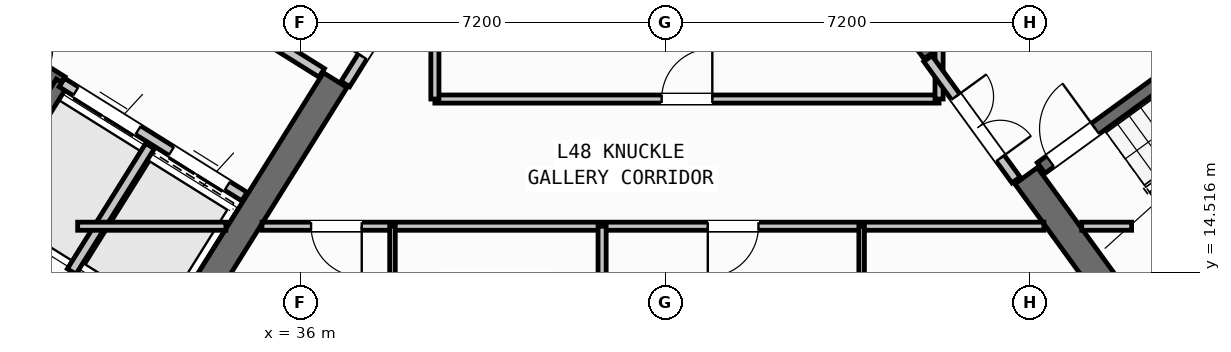
"""IFC4 building model, lengths in metres.
Left out: names, types, materials, properties, quantities, classifications, styles, units other than length and angle.
Written with IfcOpenShell. Run it as: python <this file> out.ifc"""

import sys

from ifc_helpers import new_model, si_unit, direction, frame, frame_2d, origin, place, context, subcontext, project, spatial, rectangle, extrude, source, transform, mapped, element, fill, save


model = new_model("IFC4")
c1 = context("Model", 3, precision=1e-05, world=origin(), true_north=direction((0.0, 1.0)))
c2 = subcontext(c1, "Body", "Model", "MODEL_VIEW")
j1 = project(units=[si_unit("LENGTHUNIT", "METRE"), si_unit("PLANEANGLEUNIT", "RADIAN")], contexts=[c1])
p1 = place(None, origin())
s1 = spatial("IfcSite", under=j1, at=p1, CompositionType="ELEMENT")
p2 = place(p1, origin())
s2 = spatial("IfcBuilding", under=s1, at=p2, CompositionType="ELEMENT")
p3 = place(p2, frame((0.0, 0.0, 191.4)))
s3 = spatial("IfcBuildingStorey", under=s2, at=p3, CompositionType="ELEMENT", Elevation=191.4)
p4 = place(p3, frame((33.366, 12.477, 0.0), z_axis=(0.0, 0.0, 1.0), x_axis=(-0.848047359947, 0.529920442413, 0.0)))
e1 = element("IfcWall", 1, at=p4, inside=s3, PredefinedType="SHEAR", context=c2, shape_type="SweptSolid", body=[
    extrude(rectangle(XDim=13.14, YDim=0.55, at=frame_2d((6.57, 0.0))), origin(), (0.0, 0.0, 1.0), 3.32),
])
p5 = place(p3, frame((36.683, 18.304, 0.0), z_axis=(0.0, 0.0, 1.0), x_axis=(-0.529896466841, -0.848062341122, 0.0)))
e2 = element("IfcWall", 2, at=p5, inside=s3, PredefinedType="SHEAR", context=c2, shape_type="SweptSolid", body=[
    extrude(rectangle(XDim=6.425, YDim=0.55, at=frame_2d((3.212, 0.0))), origin(), (0.0, 0.0, 1.0), 3.32),
])
p6 = place(p3, frame((52.359, 13.14, 0.0), z_axis=(0.0, 0.0, 1.0), x_axis=(0.809014896919, 0.587788139183, 0.0)))
e3 = element("IfcWall", 3, at=p6, inside=s3, PredefinedType="SHEAR", context=c2, shape_type="SweptSolid", body=[
    extrude(rectangle(XDim=12.34, YDim=0.55, at=frame_2d((6.17, 0.0))), origin(), (0.0, 0.0, 1.0), 3.32),
])
p7 = place(p3, frame((52.42, 13.524, 0.0), z_axis=(0.0, 0.0, 1.0), x_axis=(-0.587802113096, 0.809004744015, 0.0)))
e4 = element("IfcWall", 4, at=p7, inside=s3, PredefinedType="SHEAR", context=c2, shape_type="SweptSolid", body=[
    extrude(rectangle(XDim=3.575, YDim=0.55, at=frame_2d((1.788, 0.0))), origin(), (0.0, 0.0, 1.0), 3.32),
])
p8 = place(p3, frame((48.526, 18.884, 0.0), z_axis=(0.0, 0.0, 1.0), x_axis=(-0.587764933797, 0.809031756236, 0.0)))
e5 = element("IfcWall", 5, at=p8, inside=s3, PredefinedType="SHEAR", context=c2, shape_type="SweptSolid", body=[
    extrude(rectangle(XDim=6.425, YDim=0.55, at=frame_2d((3.212, 0.0))), origin(), (0.0, 0.0, 1.0), 3.32),
])
p9 = place(p3, frame((31.76, 12.183, 0.0), z_axis=(0.0, 0.0, 1.0), x_axis=(-0.848047074256, 0.529920899612, 0.0)))
e6 = element("IfcWall", 6, at=p9, inside=s3, PredefinedType="STANDARD", context=c2, shape_type="SweptSolid", body=[
    extrude(rectangle(XDim=30.652, YDim=0.32, at=frame_2d((15.326, 0.0))), origin(), (0.0, 0.0, 1.0), 3.32),
])
p10 = place(p9, frame((15.166, 0.0, 0.0)))
e7 = element("IfcOpeningElement", 7, at=p10, cuts=e6, PredefinedType="OPENING", context=c2, shape_type="SweptSolid", body=[
    extrude(rectangle(XDim=1.2, YDim=2.15, at=frame_2d((0.6, 1.075))), frame((0.0, 0.17, 0.0), z_axis=(0.0, -1.0, 0.0), x_axis=(1.0, 0.0, 0.0)), (0.0, 0.0, 1.0), 0.34),
])
p11 = place(p9, frame((2.015, 0.0, 0.8)))
e8 = element("IfcOpeningElement", 8, at=p11, cuts=e6, PredefinedType="OPENING", context=c2, shape_type="SweptSolid", body=[
    extrude(rectangle(XDim=2.1, YDim=1.55, at=frame_2d((1.05, 0.775))), frame((0.0, 0.17, 0.0), z_axis=(0.0, -1.0, 0.0), x_axis=(1.0, 0.0, 0.0)), (0.0, 0.0, 1.0), 0.34),
])
p12 = place(p9, frame((7.244, 0.0, 0.8)))
e9 = element("IfcOpeningElement", 9, at=p12, cuts=e6, PredefinedType="OPENING", context=c2, shape_type="SweptSolid", body=[
    extrude(rectangle(XDim=2.1, YDim=1.55, at=frame_2d((1.05, 0.775))), frame((0.0, 0.17, 0.0), z_axis=(0.0, -1.0, 0.0), x_axis=(1.0, 0.0, 0.0)), (0.0, 0.0, 1.0), 0.34),
])
p13 = place(p9, frame((12.623, 0.0, 1.0)))
e10 = element("IfcOpeningElement", 10, at=p13, cuts=e6, PredefinedType="OPENING", context=c2, shape_type="SweptSolid", body=[
    extrude(rectangle(XDim=0.9, YDim=1.25, at=frame_2d((0.45, 0.625))), frame((0.0, 0.17, 0.0), z_axis=(0.0, -1.0, 0.0), x_axis=(1.0, 0.0, 0.0)), (0.0, 0.0, 1.0), 0.34),
])
p14 = place(p9, frame((19.565, 0.0, 0.95)))
e11 = element("IfcOpeningElement", 11, at=p14, cuts=e6, PredefinedType="OPENING", context=c2, shape_type="SweptSolid", body=[
    extrude(rectangle(XDim=1.2, YDim=1.4, at=frame_2d((0.6, 0.7))), frame((0.0, 0.17, 0.0), z_axis=(0.0, -1.0, 0.0), x_axis=(1.0, 0.0, 0.0)), (0.0, 0.0, 1.0), 0.34),
])
p15 = place(p9, frame((25.983, 0.0, 1.0)))
e12 = element("IfcOpeningElement", 12, at=p15, cuts=e6, PredefinedType="OPENING", context=c2, shape_type="SweptSolid", body=[
    extrude(rectangle(XDim=0.9, YDim=1.25, at=frame_2d((0.45, 0.625))), frame((0.0, 0.17, 0.0), z_axis=(0.0, -1.0, 0.0), x_axis=(1.0, 0.0, 0.0)), (0.0, 0.0, 1.0), 0.34),
])
p16 = place(p9, frame((28.433, 0.0, 1.0)))
e13 = element("IfcOpeningElement", 13, at=p16, cuts=e6, PredefinedType="OPENING", context=c2, shape_type="SweptSolid", body=[
    extrude(rectangle(XDim=0.9, YDim=1.25, at=frame_2d((0.45, 0.625))), frame((0.0, 0.17, 0.0), z_axis=(0.0, -1.0, 0.0), x_axis=(1.0, 0.0, 0.0)), (0.0, 0.0, 1.0), 0.34),
])
p17 = place(p3, frame((31.28, 18.261, 0.0), z_axis=(0.0, 0.0, 1.0), x_axis=(-0.848051618787, 0.529913626805, 0.0)))
e14 = element("IfcWall", 14, at=p17, inside=s3, PredefinedType="SHEAR", context=c2, shape_type="SweptSolid", body=[
    extrude(rectangle(XDim=7.46, YDim=0.26, at=frame_2d((3.73, 0.0))), origin(), (0.0, 0.0, 1.0), 3.32),
])
p18 = place(p17, frame((0.36, 0.0, 0.0)))
e15 = element("IfcOpeningElement", 15, at=p18, cuts=e14, PredefinedType="OPENING", context=c2, shape_type="SweptSolid", body=[
    extrude(rectangle(XDim=0.86, YDim=2.05, at=frame_2d((0.43, 1.025))), frame((0.0, 0.14, 0.0), z_axis=(0.0, -1.0, 0.0), x_axis=(1.0, 0.0, 0.0)), (0.0, 0.0, 1.0), 0.28),
])
p19 = place(p3, frame((31.288, 18.256, 0.0), z_axis=(0.0, 0.0, 1.0), x_axis=(-0.529943379326, -0.848033026897, 0.0)))
e16 = element("IfcWall", 16, at=p19, inside=s3, PredefinedType="SHEAR", context=c2, shape_type="SweptSolid", body=[
    extrude(rectangle(XDim=3.16, YDim=0.26, at=frame_2d((1.58, 0.0))), origin(), (0.0, 0.0, 1.0), 3.32),
])
p20 = place(p3, frame((34.891, 16.005, 0.0), z_axis=(0.0, 0.0, 1.0), x_axis=(-0.848062873452, 0.529895614884, 0.0)))
e17 = element("IfcWall", 17, at=p20, inside=s3, PredefinedType="STANDARD", context=c2, shape_type="SweptSolid", body=[
    extrude(rectangle(XDim=4.248, YDim=0.2, at=frame_2d((2.124, 0.0))), origin(), (0.0, 0.0, 1.0), 3.31),
])
p21 = place(p20, frame((0.398, 0.0, 0.0)))
e18 = element("IfcOpeningElement", 18, at=p21, cuts=e17, PredefinedType="OPENING", context=c2, shape_type="SweptSolid", body=[
    extrude(rectangle(XDim=1.3, YDim=2.2, at=frame_2d((0.65, 1.1))), frame((0.0, 0.11, 0.0), z_axis=(0.0, -1.0, 0.0), x_axis=(1.0, 0.0, 0.0)), (0.0, 0.0, 1.0), 0.22),
])
p22 = place(p20, frame((2.473, 0.0, 0.0)))
e19 = element("IfcOpeningElement", 19, at=p22, cuts=e17, PredefinedType="OPENING", context=c2, shape_type="SweptSolid", body=[
    extrude(rectangle(XDim=1.45, YDim=2.25, at=frame_2d((0.725, 1.125))), frame((0.0, 0.11, 0.0), z_axis=(0.0, -1.0, 0.0), x_axis=(1.0, 0.0, 0.0)), (0.0, 0.0, 1.0), 0.22),
])
p23 = place(p3, frame((36.417, 18.447, 0.0), z_axis=(0.0, 0.0, 1.0), x_axis=(-0.848064879198, 0.529892404805, 0.0)))
e20 = element("IfcWall", 20, at=p23, inside=s3, PredefinedType="STANDARD", context=c2, shape_type="SweptSolid", body=[
    extrude(rectangle(XDim=5.768, YDim=0.2, at=frame_2d((2.884, 0.0))), origin(), (0.0, 0.0, 1.0), 3.31),
])
p24 = place(p23, frame((2.548, 0.0, 0.0)))
e21 = element("IfcOpeningElement", 21, at=p24, cuts=e20, PredefinedType="OPENING", context=c2, shape_type="SweptSolid", body=[
    extrude(rectangle(XDim=1.15, YDim=2.1, at=frame_2d((0.575, 1.05))), frame((0.0, 0.11, 0.0), z_axis=(0.0, -1.0, 0.0), x_axis=(1.0, 0.0, 0.0)), (0.0, 0.0, 1.0), 0.22),
])
p25 = place(p3, frame((33.029, 17.003, 0.0), z_axis=(0.0, 0.0, 1.0), x_axis=(-0.529916267533, -0.848049968695, 0.0)))
e22 = element("IfcWall", 22, at=p25, inside=s3, PredefinedType="STANDARD", context=c2, shape_type="SweptSolid", body=[
    extrude(rectangle(XDim=2.92, YDim=0.2, at=frame_2d((1.46, 0.0))), origin(), (0.0, 0.0, 1.0), 3.31),
])
p26 = place(p3, frame((52.472, 14.013, 0.0), z_axis=(0.0, 0.0, 1.0), x_axis=(0.809028366311, 0.587769599847, 0.0)))
e23 = element("IfcWall", 23, at=p26, inside=s3, PredefinedType="SHEAR", context=c2, shape_type="SweptSolid", body=[
    extrude(rectangle(XDim=7.33, YDim=0.26, at=frame_2d((3.665, 0.0))), origin(), (0.0, 0.0, 1.0), 3.32),
])
p27 = place(p3, frame((50.615, 16.57, 0.0), z_axis=(0.0, 0.0, 1.0), x_axis=(0.809028366311, 0.587769599847, 0.0)))
e24 = element("IfcWall", 24, at=p27, inside=s3, PredefinedType="SHEAR", context=c2, shape_type="SweptSolid", body=[
    extrude(rectangle(XDim=7.33, YDim=0.26, at=frame_2d((3.665, 0.0))), origin(), (0.0, 0.0, 1.0), 3.32),
])
p28 = place(p27, frame((0.22, 0.0, 0.0)))
e25 = element("IfcOpeningElement", 25, at=p28, cuts=e24, PredefinedType="OPENING", context=c2, shape_type="SweptSolid", body=[
    extrude(rectangle(XDim=1.1, YDim=2.1, at=frame_2d((0.55, 1.05))), frame((0.0, 0.14, 0.0), z_axis=(0.0, -1.0, 0.0), x_axis=(1.0, 0.0, 0.0)), (0.0, 0.0, 1.0), 0.28),
])
p29 = place(p3, frame((38.451, 20.737, 0.0), z_axis=(0.0, 0.0, 1.0), x_axis=(-0.529924799939, -0.848044637038, 0.0)))
e26 = element("IfcWall", 26, at=p29, inside=s3, PredefinedType="STANDARD", context=c2, shape_type="SweptSolid", body=[
    extrude(rectangle(XDim=2.96, YDim=0.2, at=frame_2d((1.48, 0.0))), origin(), (0.0, 0.0, 1.0), 3.31),
])
p30 = place(p29, frame((1.46, 0.0, 0.0)))
e27 = element("IfcOpeningElement", 27, at=p30, cuts=e26, PredefinedType="OPENING", context=c2, shape_type="SweptSolid", body=[
    extrude(rectangle(XDim=0.86, YDim=2.05, at=frame_2d((0.43, 1.025))), frame((0.0, 0.11, 0.0), z_axis=(0.0, -1.0, 0.0), x_axis=(1.0, 0.0, 0.0)), (0.0, 0.0, 1.0), 0.22),
])
p31 = place(p3, frame((31.6, 15.42, 0.0), z_axis=(0.0, 0.0, 1.0), x_axis=(1.0, 0.0, 0.0)))
e28 = element("IfcWall", 28, at=p31, inside=s3, PredefinedType="PARTITIONING", context=c2, shape_type="SweptSolid", body=[
    extrude(rectangle(XDim=2.925, YDim=0.16, at=frame_2d((1.462, 0.0))), origin(), (0.0, 0.0, 1.0), 3.31),
])
p32 = place(p3, frame((35.237, 15.42, 0.0), z_axis=(0.0, 0.0, 1.0), x_axis=(1.0, 0.0, 0.0)))
e29 = element("IfcWall", 29, at=p32, inside=s3, PredefinedType="PARTITIONING", context=c2, shape_type="SweptSolid", body=[
    extrude(rectangle(XDim=15.432, YDim=0.16, at=frame_2d((7.716, 0.0))), origin(), (0.0, 0.0, 1.0), 3.31),
])
p33 = place(p32, frame((0.969, 0.0, 0.0)))
e30 = element("IfcOpeningElement", 30, at=p33, cuts=e29, PredefinedType="OPENING", context=c2, shape_type="SweptSolid", body=[
    extrude(rectangle(XDim=1.0, YDim=2.1, at=frame_2d((0.5, 1.05))), frame((0.0, 0.09, 0.0), z_axis=(0.0, -1.0, 0.0), x_axis=(1.0, 0.0, 0.0)), (0.0, 0.0, 1.0), 0.18),
])
p34 = place(p32, frame((8.799, 0.0, 0.0)))
e31 = element("IfcOpeningElement", 31, at=p34, cuts=e29, PredefinedType="OPENING", context=c2, shape_type="SweptSolid", body=[
    extrude(rectangle(XDim=1.0, YDim=2.1, at=frame_2d((0.5, 1.05))), frame((0.0, 0.09, 0.0), z_axis=(0.0, -1.0, 0.0), x_axis=(1.0, 0.0, 0.0)), (0.0, 0.0, 1.0), 0.18),
])
p35 = place(p3, frame((51.416, 15.42, 0.0), z_axis=(0.0, 0.0, 1.0), x_axis=(1.0, 0.0, 0.0)))
e32 = element("IfcWall", 32, at=p35, inside=s3, PredefinedType="PARTITIONING", context=c2, shape_type="SweptSolid", body=[
    extrude(rectangle(XDim=0.984, YDim=0.16, at=frame_2d((0.492, 0.0))), origin(), (0.0, 0.0, 1.0), 3.31),
])
p36 = place(p3, frame((38.65, 17.93, 0.0), z_axis=(0.0, 0.0, 1.0), x_axis=(1.0, 0.0, 0.0)))
e33 = element("IfcWall", 33, at=p36, inside=s3, PredefinedType="PARTITIONING", context=c2, shape_type="SweptSolid", body=[
    extrude(rectangle(XDim=9.95, YDim=0.16, at=frame_2d((4.975, 0.0))), origin(), (0.0, 0.0, 1.0), 3.31),
])
p37 = place(p36, frame((4.475, 0.0, 0.0)))
e34 = element("IfcOpeningElement", 34, at=p37, cuts=e33, PredefinedType="OPENING", context=c2, shape_type="SweptSolid", body=[
    extrude(rectangle(XDim=1.0, YDim=2.1, at=frame_2d((0.5, 1.05))), frame((0.0, 0.09, 0.0), z_axis=(0.0, -1.0, 0.0), x_axis=(1.0, 0.0, 0.0)), (0.0, 0.0, 1.0), 0.18),
])
p38 = place(p3, frame((38.65, 17.93, 0.0), z_axis=(0.0, 0.0, 1.0), x_axis=(0.0, 1.0, 0.0)))
e35 = element("IfcWall", 35, at=p38, inside=s3, PredefinedType="PARTITIONING", context=c2, shape_type="SweptSolid", body=[
    extrude(rectangle(XDim=2.951, YDim=0.16, at=frame_2d((1.476, 0.0))), origin(), (0.0, 0.0, 1.0), 3.31),
])
p39 = place(p3, frame((48.6, 17.93, 0.0), z_axis=(0.0, 0.0, 1.0), x_axis=(0.0, 1.0, 0.0)))
e36 = element("IfcWall", 36, at=p39, inside=s3, PredefinedType="PARTITIONING", context=c2, shape_type="SweptSolid", body=[
    extrude(rectangle(XDim=0.993, YDim=0.16, at=frame_2d((0.496, 0.0))), origin(), (0.0, 0.0, 1.0), 3.31),
])
p40 = place(p3, frame((50.119, 16.333, 0.0), z_axis=(0.0, 0.0, 1.0), x_axis=(-0.587749856981, 0.809042709391, 0.0)))
e37 = element("IfcWall", 37, at=p40, inside=s3, PredefinedType="STANDARD", context=c2, shape_type="SweptSolid", body=[
    extrude(rectangle(XDim=2.96, YDim=0.2, at=frame_2d((1.48, 0.0))), origin(), (0.0, 0.0, 1.0), 3.31),
])
p41 = place(p40, frame((0.53, 0.0, 0.0)))
e38 = element("IfcOpeningElement", 38, at=p41, cuts=e37, PredefinedType="OPENING", context=c2, shape_type="SweptSolid", body=[
    extrude(rectangle(XDim=1.5, YDim=2.15, at=frame_2d((0.75, 1.075))), frame((0.0, 0.11, 0.0), z_axis=(0.0, -1.0, 0.0), x_axis=(1.0, 0.0, 0.0)), (0.0, 0.0, 1.0), 0.22),
])
p42 = place(p3, frame((41.95, 1.96, 0.0), z_axis=(0.0, 0.0, 1.0), x_axis=(0.0, 1.0, 0.0)))
e39 = element("IfcWall", 39, at=p42, inside=s3, PredefinedType="PARTITIONING", context=c2, shape_type="SweptSolid", body=[
    extrude(rectangle(XDim=13.46, YDim=0.16, at=frame_2d((6.73, 0.0))), origin(), (0.0, 0.0, 1.0), 3.31),
])
p43 = place(p3, frame((37.813, 1.96, 0.0), z_axis=(0.0, 0.0, 1.0), x_axis=(0.0, 1.0, 0.0)))
e40 = element("IfcWall", 40, at=p43, inside=s3, PredefinedType="PARTITIONING", context=c2, shape_type="SweptSolid", body=[
    extrude(rectangle(XDim=13.46, YDim=0.11, at=frame_2d((6.73, 0.0))), origin(), (0.0, 0.0, 1.0), 3.31),
])
p44 = place(p43, frame((5.5, 0.0, 0.0)))
e41 = element("IfcOpeningElement", 41, at=p44, cuts=e40, PredefinedType="OPENING", context=c2, shape_type="SweptSolid", body=[
    extrude(rectangle(XDim=0.92, YDim=2.08, at=frame_2d((0.46, 1.04))), frame((0.0, 0.065, 0.0), z_axis=(0.0, -1.0, 0.0), x_axis=(1.0, 0.0, 0.0)), (0.0, 0.0, 1.0), 0.13),
])
p45 = place(p43, frame((10.45, 0.0, 0.0)))
e42 = element("IfcOpeningElement", 42, at=p45, cuts=e40, PredefinedType="OPENING", context=c2, shape_type="SweptSolid", body=[
    extrude(rectangle(XDim=0.88, YDim=2.08, at=frame_2d((0.44, 1.04))), frame((0.0, 0.065, 0.0), z_axis=(0.0, -1.0, 0.0), x_axis=(1.0, 0.0, 0.0)), (0.0, 0.0, 1.0), 0.13),
])
p46 = place(p3, frame((47.072, 1.96, 0.0), z_axis=(0.0, 0.0, 1.0), x_axis=(0.0, 1.0, 0.0)))
e43 = element("IfcWall", 43, at=p46, inside=s3, PredefinedType="PARTITIONING", context=c2, shape_type="SweptSolid", body=[
    extrude(rectangle(XDim=13.46, YDim=0.11, at=frame_2d((6.73, 0.0))), origin(), (0.0, 0.0, 1.0), 3.31),
])
p47 = place(p46, frame((6.6, 0.0, 0.0)))
e44 = element("IfcOpeningElement", 44, at=p47, cuts=e43, PredefinedType="OPENING", context=c2, shape_type="SweptSolid", body=[
    extrude(rectangle(XDim=0.92, YDim=2.08, at=frame_2d((0.46, 1.04))), frame((0.0, 0.065, 0.0), z_axis=(0.0, -1.0, 0.0), x_axis=(1.0, 0.0, 0.0)), (0.0, 0.0, 1.0), 0.13),
])
p48 = place(p46, frame((11.1, 0.0, 0.0)))
e45 = element("IfcOpeningElement", 45, at=p48, cuts=e43, PredefinedType="OPENING", context=c2, shape_type="SweptSolid", body=[
    extrude(rectangle(XDim=0.88, YDim=2.08, at=frame_2d((0.44, 1.04))), frame((0.0, 0.065, 0.0), z_axis=(0.0, -1.0, 0.0), x_axis=(1.0, 0.0, 0.0)), (0.0, 0.0, 1.0), 0.13),
])
m1 = source(origin(), c2, "Body", "SweptSolid", [
    extrude(rectangle(XDim=1.3, YDim=2.2, at=frame_2d((0.65, 1.1))), frame((0.0, 0.025, 0.0), z_axis=(0.0, -1.0, 0.0), x_axis=(1.0, 0.0, 0.0)), (0.0, 0.0, 1.0), 0.05),
])
p49 = place(p21, origin())
e46 = element("IfcDoor", 46, at=p49, inside=s3, OperationType="DOUBLE_DOOR_SLIDING", PredefinedType="DOOR", context=c2, shape_type="MappedRepresentation", body=[
    mapped(m1, transform((0.0, 0.0, 0.0), scale=1.0)),
])
fill(e18, e46)
m2 = source(origin(), c2, "Body", "SweptSolid", [
    extrude(rectangle(XDim=1.45, YDim=2.25, at=frame_2d((0.725, 1.125))), frame((0.0, 0.025, 0.0), z_axis=(0.0, -1.0, 0.0), x_axis=(1.0, 0.0, 0.0)), (0.0, 0.0, 1.0), 0.05),
])
p50 = place(p22, origin())
e47 = element("IfcDoor", 47, at=p50, inside=s3, OperationType="DOUBLE_DOOR_SLIDING", PredefinedType="DOOR", context=c2, shape_type="MappedRepresentation", body=[
    mapped(m2, transform((0.0, 0.0, 0.0), scale=1.0)),
])
fill(e19, e47)
m3 = source(origin(), c2, "Body", "SweptSolid", [
    extrude(rectangle(XDim=1.1, YDim=2.1, at=frame_2d((0.55, 1.05))), frame((0.0, 0.025, 0.0), z_axis=(0.0, -1.0, 0.0), x_axis=(1.0, 0.0, 0.0)), (0.0, 0.0, 1.0), 0.05),
])
p51 = place(p28, origin())
e48 = element("IfcDoor", 48, at=p51, inside=s3, OperationType="SINGLE_SWING_RIGHT", PredefinedType="DOOR", context=c2, shape_type="MappedRepresentation", body=[
    mapped(m3, transform((0.0, 0.0, 0.0), scale=1.0)),
])
fill(e25, e48)
m4 = source(origin(), c2, "Body", "SweptSolid", [
    extrude(rectangle(XDim=1.0, YDim=2.1, at=frame_2d((0.5, 1.05))), frame((0.0, 0.025, 0.0), z_axis=(0.0, -1.0, 0.0), x_axis=(1.0, 0.0, 0.0)), (0.0, 0.0, 1.0), 0.05),
])
p52 = place(p37, origin())
e49 = element("IfcDoor", 49, at=p52, inside=s3, OperationType="SINGLE_SWING_RIGHT", PredefinedType="DOOR", context=c2, shape_type="MappedRepresentation", body=[
    mapped(m4, transform((0.0, 0.0, 0.0), scale=1.0)),
])
fill(e34, e49)
m5 = source(origin(), c2, "Body", "SweptSolid", [
    extrude(rectangle(XDim=0.86, YDim=2.05, at=frame_2d((0.43, 1.025))), frame((0.0, 0.025, 0.0), z_axis=(0.0, -1.0, 0.0), x_axis=(1.0, 0.0, 0.0)), (0.0, 0.0, 1.0), 0.05),
])
p53 = place(p30, frame((0.86, 0.0, 0.0), z_axis=(0.0, 0.0, 1.0), x_axis=(-1.0, 0.0, 0.0)))
e50 = element("IfcDoor", 50, at=p53, inside=s3, OperationType="SINGLE_SWING_LEFT", PredefinedType="DOOR", context=c2, shape_type="MappedRepresentation", body=[
    mapped(m5, transform((0.0, 0.0, 0.0), scale=1.0)),
])
fill(e27, e50)
m6 = source(origin(), c2, "Body", "SweptSolid", [
    extrude(rectangle(XDim=1.5, YDim=2.15, at=frame_2d((0.75, 1.075))), frame((0.0, 0.025, 0.0), z_axis=(0.0, -1.0, 0.0), x_axis=(1.0, 0.0, 0.0)), (0.0, 0.0, 1.0), 0.05),
])
p54 = place(p41, frame((1.5, 0.0, 0.0), z_axis=(0.0, 0.0, 1.0), x_axis=(-1.0, 0.0, 0.0)))
e51 = element("IfcDoor", 51, at=p54, inside=s3, OperationType="DOUBLE_DOOR_SINGLE_SWING", PredefinedType="DOOR", context=c2, shape_type="MappedRepresentation", body=[
    mapped(m6, transform((0.0, 0.0, 0.0), scale=1.0)),
])
fill(e38, e51)
p55 = place(p33, frame((1.0, 0.0, 0.0), z_axis=(0.0, 0.0, 1.0), x_axis=(-1.0, 0.0, 0.0)))
e52 = element("IfcDoor", 52, at=p55, inside=s3, OperationType="SINGLE_SWING_LEFT", PredefinedType="DOOR", context=c2, shape_type="MappedRepresentation", body=[
    mapped(m4, transform((0.0, 0.0, 0.0), scale=1.0)),
])
fill(e30, e52)
p56 = place(p34, frame((1.0, 0.0, 0.0), z_axis=(0.0, 0.0, 1.0), x_axis=(-1.0, 0.0, 0.0)))
e53 = element("IfcDoor", 53, at=p56, inside=s3, OperationType="SINGLE_SWING_RIGHT", PredefinedType="DOOR", context=c2, shape_type="MappedRepresentation", body=[
    mapped(m4, transform((0.0, 0.0, 0.0), scale=1.0)),
])
fill(e31, e53)
save(model, sys.argv[1])
